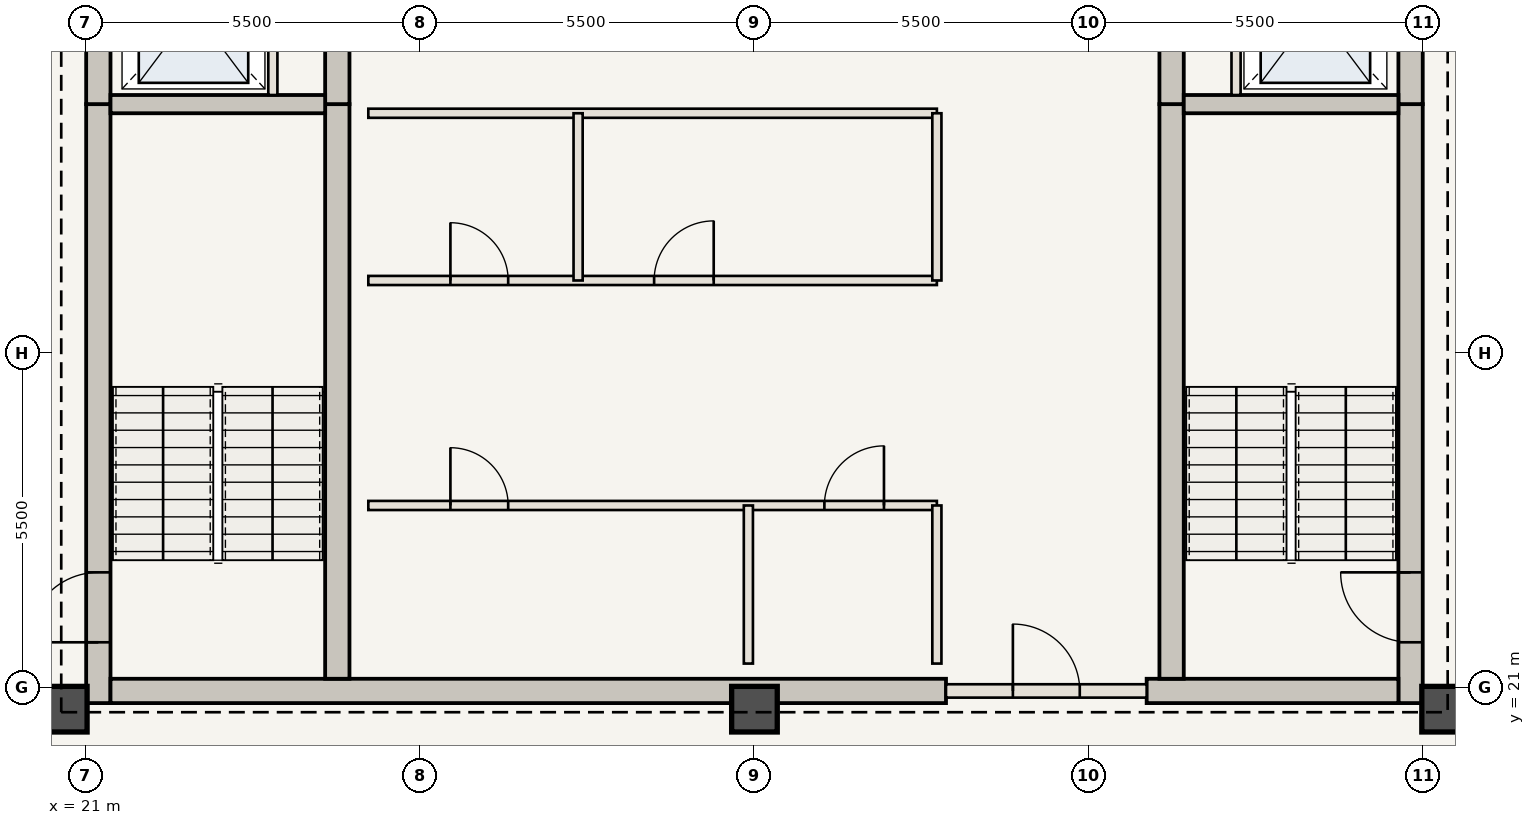
"""IFC4 building model, lengths in metres.
Left out: names, types, materials, properties, quantities, classifications, styles, units other than length and angle.
Written with IfcOpenShell. Run it as: python <this file> out.ifc"""

import sys

from ifc_helpers import new_model, si_unit, direction, frame, frame_2d, origin, origin_2d, place, context, subcontext, project, spatial, rectangle, extrude, element, fill, save


model = new_model("IFC4")
c1 = context("Model", 3, precision=1e-05, world=origin(), true_north=direction((0.0, 1.0)))
c2 = subcontext(c1, "Body", "Model", "MODEL_VIEW")
j1 = project(units=[si_unit("LENGTHUNIT", "METRE"), si_unit("PLANEANGLEUNIT", "RADIAN")], contexts=[c1])
p1 = place(None, origin())
s1 = spatial("IfcSite", under=j1, at=p1, CompositionType="ELEMENT")
p2 = place(p1, origin())
s2 = spatial("IfcBuilding", under=s1, at=p2, CompositionType="ELEMENT")
p3 = place(p2, frame((0.0, 0.0, 269.85)))
s3 = spatial("IfcBuildingStorey", under=s2, at=p3, CompositionType="ELEMENT", Elevation=269.85)
p4 = place(p3, frame((21.21, 20.75, 0.0), z_axis=(0.0, 0.0, 1.0), x_axis=(0.0, 1.0, 0.0)))
e1 = element("IfcWall", 1, at=p4, inside=s3, PredefinedType="SHEAR", context=c2, shape_type="SweptSolid", body=[
    extrude(rectangle(XDim=9.85, YDim=0.4, at=frame_2d((4.925, 0.0))), origin(), (0.0, 0.0, 1.0), 3.85),
])
p5 = place(p4, frame((1.0, 0.0, 0.0)))
e2 = element("IfcOpeningElement", 2, at=p5, cuts=e1, PredefinedType="OPENING", context=c2, shape_type="SweptSolid", body=[
    extrude(rectangle(XDim=1.15, YDim=2.15, at=frame_2d((0.575, 1.075))), frame((0.0, 0.21, 0.0), z_axis=(0.0, -1.0, 0.0), x_axis=(1.0, 0.0, 0.0)), (0.0, 0.0, 1.0), 0.42),
])
p6 = place(p3, frame((21.21, 30.6, 0.0), z_axis=(0.0, 0.0, 1.0), x_axis=(0.0, 1.0, 0.0)))
e3 = element("IfcWall", 3, at=p6, inside=s3, PredefinedType="SHEAR", context=c2, shape_type="SweptSolid", body=[
    extrude(rectangle(XDim=12.6, YDim=0.4, at=frame_2d((6.3, 0.0))), origin(), (0.0, 0.0, 1.0), 3.85),
])
p7 = place(p6, frame((4.2, 0.0, 0.0)))
e4 = element("IfcOpeningElement", 4, at=p7, cuts=e3, PredefinedType="OPENING", context=c2, shape_type="SweptSolid", body=[
    extrude(rectangle(XDim=1.1, YDim=2.15, at=frame_2d((0.55, 1.075))), frame((0.0, 0.21, 0.0), z_axis=(0.0, -1.0, 0.0), x_axis=(1.0, 0.0, 0.0)), (0.0, 0.0, 1.0), 0.42),
])
p8 = place(p6, frame((8.05, 0.0, 0.0)))
e5 = element("IfcOpeningElement", 5, at=p8, cuts=e3, PredefinedType="OPENING", context=c2, shape_type="SweptSolid", body=[
    extrude(rectangle(XDim=0.92, YDim=2.1, at=frame_2d((0.46, 1.05))), frame((0.0, 0.21, 0.0), z_axis=(0.0, -1.0, 0.0), x_axis=(1.0, 0.0, 0.0)), (0.0, 0.0, 1.0), 0.42),
])
p9 = place(p6, frame((9.45, 0.0, 0.0)))
e6 = element("IfcOpeningElement", 6, at=p9, cuts=e3, PredefinedType="OPENING", context=c2, shape_type="SweptSolid", body=[
    extrude(rectangle(XDim=0.88, YDim=2.1, at=frame_2d((0.44, 1.05))), frame((0.0, 0.21, 0.0), z_axis=(0.0, -1.0, 0.0), x_axis=(1.0, 0.0, 0.0)), (0.0, 0.0, 1.0), 0.42),
])
p10 = place(p6, frame((10.85, 0.0, 0.0)))
e7 = element("IfcOpeningElement", 7, at=p10, cuts=e3, PredefinedType="OPENING", context=c2, shape_type="SweptSolid", body=[
    extrude(rectangle(XDim=0.88, YDim=2.1, at=frame_2d((0.44, 1.05))), frame((0.0, 0.21, 0.0), z_axis=(0.0, -1.0, 0.0), x_axis=(1.0, 0.0, 0.0)), (0.0, 0.0, 1.0), 0.42),
])
p11 = place(p3, frame((42.79, 20.75, 0.0), z_axis=(0.0, 0.0, 1.0), x_axis=(0.0, 1.0, 0.0)))
e8 = element("IfcWall", 8, at=p11, inside=s3, PredefinedType="SHEAR", context=c2, shape_type="SweptSolid", body=[
    extrude(rectangle(XDim=9.85, YDim=0.4, at=frame_2d((4.925, 0.0))), origin(), (0.0, 0.0, 1.0), 3.85),
])
p12 = place(p11, frame((1.0, 0.0, 0.0)))
e9 = element("IfcOpeningElement", 9, at=p12, cuts=e8, PredefinedType="OPENING", context=c2, shape_type="SweptSolid", body=[
    extrude(rectangle(XDim=1.15, YDim=2.15, at=frame_2d((0.575, 1.075))), frame((0.0, 0.21, 0.0), z_axis=(0.0, -1.0, 0.0), x_axis=(1.0, 0.0, 0.0)), (0.0, 0.0, 1.0), 0.42),
])
p13 = place(p3, frame((42.79, 30.6, 0.0), z_axis=(0.0, 0.0, 1.0), x_axis=(0.0, 1.0, 0.0)))
e10 = element("IfcWall", 10, at=p13, inside=s3, PredefinedType="SHEAR", context=c2, shape_type="SweptSolid", body=[
    extrude(rectangle(XDim=12.6, YDim=0.4, at=frame_2d((6.3, 0.0))), origin(), (0.0, 0.0, 1.0), 3.85),
])
p14 = place(p13, frame((4.2, 0.0, 0.0)))
e11 = element("IfcOpeningElement", 11, at=p14, cuts=e10, PredefinedType="OPENING", context=c2, shape_type="SweptSolid", body=[
    extrude(rectangle(XDim=1.1, YDim=2.15, at=frame_2d((0.55, 1.075))), frame((0.0, 0.21, 0.0), z_axis=(0.0, -1.0, 0.0), x_axis=(1.0, 0.0, 0.0)), (0.0, 0.0, 1.0), 0.42),
])
p15 = place(p13, frame((9.2, 0.0, 0.0)))
e12 = element("IfcOpeningElement", 12, at=p15, cuts=e10, PredefinedType="OPENING", context=c2, shape_type="SweptSolid", body=[
    extrude(rectangle(XDim=0.92, YDim=2.1, at=frame_2d((0.46, 1.05))), frame((0.0, 0.21, 0.0), z_axis=(0.0, -1.0, 0.0), x_axis=(1.0, 0.0, 0.0)), (0.0, 0.0, 1.0), 0.42),
])
p16 = place(p3, frame((21.41, 20.95, 0.0), z_axis=(0.0, 0.0, 1.0), x_axis=(1.0, 0.0, 0.0)))
e13 = element("IfcWall", 13, at=p16, inside=s3, PredefinedType="SHEAR", context=c2, shape_type="SweptSolid", body=[
    extrude(rectangle(XDim=13.74, YDim=0.4, at=frame_2d((6.87, 0.0))), origin(), (0.0, 0.0, 1.0), 3.85),
])
p17 = place(p3, frame((38.45, 20.95, 0.0), z_axis=(0.0, 0.0, 1.0), x_axis=(1.0, 0.0, 0.0)))
e14 = element("IfcWall", 14, at=p17, inside=s3, PredefinedType="SHEAR", context=c2, shape_type="SweptSolid", body=[
    extrude(rectangle(XDim=4.14, YDim=0.4, at=frame_2d((2.07, 0.0))), origin(), (0.0, 0.0, 1.0), 3.85),
])
p18 = place(p3, frame((25.14, 21.15, 0.0), z_axis=(0.0, 0.0, 1.0), x_axis=(0.0, 1.0, 0.0)))
e15 = element("IfcWall", 15, at=p18, inside=s3, PredefinedType="SHEAR", context=c2, shape_type="SweptSolid", body=[
    extrude(rectangle(XDim=9.45, YDim=0.4, at=frame_2d((4.725, 0.0))), origin(), (0.0, 0.0, 1.0), 3.85),
])
p19 = place(p3, frame((25.14, 30.6, 0.0), z_axis=(0.0, 0.0, 1.0), x_axis=(0.0, 1.0, 0.0)))
e16 = element("IfcWall", 16, at=p19, inside=s3, PredefinedType="SHEAR", context=c2, shape_type="SweptSolid", body=[
    extrude(rectangle(XDim=12.2, YDim=0.4, at=frame_2d((6.1, 0.0))), origin(), (0.0, 0.0, 1.0), 3.85),
])
p20 = place(p19, frame((6.25, 0.0, 0.0)))
e17 = element("IfcOpeningElement", 17, at=p20, cuts=e16, PredefinedType="OPENING", context=c2, shape_type="SweptSolid", body=[
    extrude(rectangle(XDim=1.1, YDim=2.15, at=frame_2d((0.55, 1.075))), frame((0.0, 0.21, 0.0), z_axis=(0.0, -1.0, 0.0), x_axis=(1.0, 0.0, 0.0)), (0.0, 0.0, 1.0), 0.42),
])
p21 = place(p3, frame((38.86, 21.15, 0.0), z_axis=(0.0, 0.0, 1.0), x_axis=(0.0, 1.0, 0.0)))
e18 = element("IfcWall", 18, at=p21, inside=s3, PredefinedType="SHEAR", context=c2, shape_type="SweptSolid", body=[
    extrude(rectangle(XDim=9.45, YDim=0.4, at=frame_2d((4.725, 0.0))), origin(), (0.0, 0.0, 1.0), 3.85),
])
p22 = place(p3, frame((38.86, 30.6, 0.0), z_axis=(0.0, 0.0, 1.0), x_axis=(0.0, 1.0, 0.0)))
e19 = element("IfcWall", 19, at=p22, inside=s3, PredefinedType="SHEAR", context=c2, shape_type="SweptSolid", body=[
    extrude(rectangle(XDim=12.2, YDim=0.4, at=frame_2d((6.1, 0.0))), origin(), (0.0, 0.0, 1.0), 3.85),
])
for number, where, z_axis, x_axis in (
    (20, (20.65, 20.65, 0.0), (0.0, 0.0, 1.0), (1.0, 0.0, 0.0)),
    (21, (32.0, 20.65, 0.0), (0.0, 0.0, 1.0), (1.0, 0.0, 0.0)),
    (22, (43.35, 20.65, 0.0), (0.0, 0.0, 1.0), (1.0, 0.0, 0.0)),
):
    element("IfcColumn", number, at=place(p3, frame(where, z_axis=z_axis, x_axis=x_axis)), inside=s3, PredefinedType="COLUMN", context=c2, shape_type="SweptSolid", body=[
        extrude(rectangle(XDim=0.75, YDim=0.75, at=origin_2d()), origin(), (0.0, 0.0, 1.0), 3.85),
    ])
for number, where, z_axis, x_axis in (
    (23, (21.41, 30.6, 0.0), (0.0, 0.0, 1.0), (1.0, 0.0, 0.0)),
    (24, (39.06, 30.6, 0.0), (0.0, 0.0, 1.0), (1.0, 0.0, 0.0)),
):
    element("IfcWall", number, at=place(p3, frame(where, z_axis=z_axis, x_axis=x_axis)), inside=s3, PredefinedType="SHEAR", context=c2, shape_type="SweptSolid", body=[
        extrude(rectangle(XDim=3.53, YDim=0.3, at=frame_2d((1.765, 0.0))), origin(), (0.0, 0.0, 1.0), 3.685),
    ])
for number, where, z_axis, x_axis in (
    (25, (24.08, 30.75, 0.0), (0.0, 0.0, 1.0), (0.0, 1.0, 0.0)),
    (26, (39.92, 30.75, 0.0), (0.0, 0.0, 1.0), (0.0, 1.0, 0.0)),
):
    element("IfcWall", number, at=place(p3, frame(where, z_axis=z_axis, x_axis=x_axis)), inside=s3, PredefinedType="STANDARD", context=c2, shape_type="SweptSolid", body=[
        extrude(rectangle(XDim=2.65, YDim=0.15, at=frame_2d((1.325, 0.0))), origin(), (0.0, 0.0, 1.0), 3.685),
    ])
p23 = place(p3, frame((35.15, 20.95, 0.0), z_axis=(0.0, 0.0, 1.0), x_axis=(1.0, 0.0, 0.0)))
e27 = element("IfcWall", 27, at=p23, inside=s3, PredefinedType="STANDARD", context=c2, shape_type="SweptSolid", body=[
    extrude(rectangle(XDim=3.3, YDim=0.22, at=frame_2d((1.65, 0.0))), origin(), (0.0, 0.0, 1.0), 3.685),
])
p24 = place(p23, frame((1.1, 0.0, 0.0)))
e28 = element("IfcOpeningElement", 28, at=p24, cuts=e27, PredefinedType="OPENING", context=c2, shape_type="SweptSolid", body=[
    extrude(rectangle(XDim=1.1, YDim=2.15, at=frame_2d((0.55, 1.075))), frame((0.0, 0.12, 0.0), z_axis=(0.0, -1.0, 0.0), x_axis=(1.0, 0.0, 0.0)), (0.0, 0.0, 1.0), 0.24),
])
p25 = place(p3, frame((25.65, 24.0, 0.0), z_axis=(0.0, 0.0, 1.0), x_axis=(1.0, 0.0, 0.0)))
e29 = element("IfcWall", 29, at=p25, inside=s3, PredefinedType="STANDARD", context=c2, shape_type="SweptSolid", body=[
    extrude(rectangle(XDim=9.35, YDim=0.15, at=frame_2d((4.675, 0.0))), origin(), (0.0, 0.0, 1.0), 3.685),
])
p26 = place(p25, frame((1.35, 0.0, 0.0)))
e30 = element("IfcOpeningElement", 30, at=p26, cuts=e29, PredefinedType="OPENING", context=c2, shape_type="SweptSolid", body=[
    extrude(rectangle(XDim=0.95, YDim=2.15, at=frame_2d((0.475, 1.075))), frame((0.0, 0.085, 0.0), z_axis=(0.0, -1.0, 0.0), x_axis=(1.0, 0.0, 0.0)), (0.0, 0.0, 1.0), 0.17),
])
p27 = place(p25, frame((7.5, 0.0, 0.0)))
e31 = element("IfcOpeningElement", 31, at=p27, cuts=e29, PredefinedType="OPENING", context=c2, shape_type="SweptSolid", body=[
    extrude(rectangle(XDim=0.98, YDim=2.2, at=frame_2d((0.49, 1.1))), frame((0.0, 0.085, 0.0), z_axis=(0.0, -1.0, 0.0), x_axis=(1.0, 0.0, 0.0)), (0.0, 0.0, 1.0), 0.17),
])
for number, where, z_axis, x_axis in (
    (32, (31.9, 21.4, 0.0), (0.0, 0.0, 1.0), (0.0, 1.0, 0.0)),
    (33, (35.0, 21.4, 0.0), (0.0, 0.0, 1.0), (0.0, 1.0, 0.0)),
):
    element("IfcWall", number, at=place(p3, frame(where, z_axis=z_axis, x_axis=x_axis)), inside=s3, PredefinedType="STANDARD", context=c2, shape_type="SweptSolid", body=[
        extrude(rectangle(XDim=2.6, YDim=0.15, at=frame_2d((1.3, 0.0))), origin(), (0.0, 0.0, 1.0), 3.685),
    ])
p28 = place(p3, frame((25.65, 27.7, 0.0), z_axis=(0.0, 0.0, 1.0), x_axis=(1.0, 0.0, 0.0)))
e34 = element("IfcWall", 34, at=p28, inside=s3, PredefinedType="STANDARD", context=c2, shape_type="SweptSolid", body=[
    extrude(rectangle(XDim=9.35, YDim=0.15, at=frame_2d((4.675, 0.0))), origin(), (0.0, 0.0, 1.0), 3.685),
])
p29 = place(p28, frame((1.35, 0.0, 0.0)))
e35 = element("IfcOpeningElement", 35, at=p29, cuts=e34, PredefinedType="OPENING", context=c2, shape_type="SweptSolid", body=[
    extrude(rectangle(XDim=0.95, YDim=2.15, at=frame_2d((0.475, 1.075))), frame((0.0, 0.085, 0.0), z_axis=(0.0, -1.0, 0.0), x_axis=(1.0, 0.0, 0.0)), (0.0, 0.0, 1.0), 0.17),
])
p30 = place(p28, frame((4.7, 0.0, 0.0)))
e36 = element("IfcOpeningElement", 36, at=p30, cuts=e34, PredefinedType="OPENING", context=c2, shape_type="SweptSolid", body=[
    extrude(rectangle(XDim=0.98, YDim=2.2, at=frame_2d((0.49, 1.1))), frame((0.0, 0.085, 0.0), z_axis=(0.0, -1.0, 0.0), x_axis=(1.0, 0.0, 0.0)), (0.0, 0.0, 1.0), 0.17),
])
p31 = place(p3, frame((25.65, 30.45, 0.0), z_axis=(0.0, 0.0, 1.0), x_axis=(1.0, 0.0, 0.0)))
e37 = element("IfcWall", 37, at=p31, inside=s3, PredefinedType="STANDARD", context=c2, shape_type="SweptSolid", body=[
    extrude(rectangle(XDim=9.35, YDim=0.15, at=frame_2d((4.675, 0.0))), origin(), (0.0, 0.0, 1.0), 3.685),
])
for number, where, z_axis, x_axis in (
    (38, (29.1, 27.7, 0.0), (0.0, 0.0, 1.0), (0.0, 1.0, 0.0)),
    (39, (35.0, 27.7, 0.0), (0.0, 0.0, 1.0), (0.0, 1.0, 0.0)),
):
    element("IfcWall", number, at=place(p3, frame(where, z_axis=z_axis, x_axis=x_axis)), inside=s3, PredefinedType="STANDARD", context=c2, shape_type="SweptSolid", body=[
        extrude(rectangle(XDim=2.75, YDim=0.15, at=frame_2d((1.375, 0.0))), origin(), (0.0, 0.0, 1.0), 3.685),
    ])
p32 = place(p5, origin())
e40 = element("IfcDoor", 40, at=p32, inside=s3, OperationType="SINGLE_SWING_LEFT", PredefinedType="DOOR", context=c2, shape_type="SweptSolid", body=[
    extrude(rectangle(XDim=1.15, YDim=2.15, at=frame_2d((0.575, 1.075))), frame((0.0, 0.025, 0.0), z_axis=(0.0, -1.0, 0.0), x_axis=(1.0, 0.0, 0.0)), (0.0, 0.0, 1.0), 0.05),
])
fill(e2, e40)
p33 = place(p12, origin())
e41 = element("IfcDoor", 41, at=p33, inside=s3, OperationType="SINGLE_SWING_RIGHT", PredefinedType="DOOR", context=c2, shape_type="SweptSolid", body=[
    extrude(rectangle(XDim=1.15, YDim=2.15, at=frame_2d((0.575, 1.075))), frame((0.0, 0.025, 0.0), z_axis=(0.0, -1.0, 0.0), x_axis=(1.0, 0.0, 0.0)), (0.0, 0.0, 1.0), 0.05),
])
fill(e9, e41)
p34 = place(p24, origin())
e42 = element("IfcDoor", 42, at=p34, inside=s3, OperationType="SINGLE_SWING_LEFT", PredefinedType="DOOR", context=c2, shape_type="SweptSolid", body=[
    extrude(rectangle(XDim=1.1, YDim=2.15, at=frame_2d((0.55, 1.075))), frame((0.0, 0.025, 0.0), z_axis=(0.0, -1.0, 0.0), x_axis=(1.0, 0.0, 0.0)), (0.0, 0.0, 1.0), 0.05),
])
fill(e28, e42)
p35 = place(p26, origin())
e43 = element("IfcDoor", 43, at=p35, inside=s3, OperationType="SINGLE_SWING_LEFT", PredefinedType="DOOR", context=c2, shape_type="SweptSolid", body=[
    extrude(rectangle(XDim=0.95, YDim=2.15, at=frame_2d((0.475, 1.075))), frame((0.0, 0.025, 0.0), z_axis=(0.0, -1.0, 0.0), x_axis=(1.0, 0.0, 0.0)), (0.0, 0.0, 1.0), 0.05),
])
fill(e30, e43)
p36 = place(p27, origin())
e44 = element("IfcDoor", 44, at=p36, inside=s3, OperationType="SINGLE_SWING_RIGHT", PredefinedType="DOOR", context=c2, shape_type="SweptSolid", body=[
    extrude(rectangle(XDim=0.98, YDim=2.2, at=frame_2d((0.49, 1.1))), frame((0.0, 0.025, 0.0), z_axis=(0.0, -1.0, 0.0), x_axis=(1.0, 0.0, 0.0)), (0.0, 0.0, 1.0), 0.05),
])
fill(e31, e44)
p37 = place(p29, origin())
e45 = element("IfcDoor", 45, at=p37, inside=s3, OperationType="SINGLE_SWING_LEFT", PredefinedType="DOOR", context=c2, shape_type="SweptSolid", body=[
    extrude(rectangle(XDim=0.95, YDim=2.15, at=frame_2d((0.475, 1.075))), frame((0.0, 0.025, 0.0), z_axis=(0.0, -1.0, 0.0), x_axis=(1.0, 0.0, 0.0)), (0.0, 0.0, 1.0), 0.05),
])
fill(e35, e45)
p38 = place(p30, origin())
e46 = element("IfcDoor", 46, at=p38, inside=s3, OperationType="SINGLE_SWING_RIGHT", PredefinedType="DOOR", context=c2, shape_type="SweptSolid", body=[
    extrude(rectangle(XDim=0.98, YDim=2.2, at=frame_2d((0.49, 1.1))), frame((0.0, 0.025, 0.0), z_axis=(0.0, -1.0, 0.0), x_axis=(1.0, 0.0, 0.0)), (0.0, 0.0, 1.0), 0.05),
])
fill(e36, e46)
save(model, sys.argv[1])
